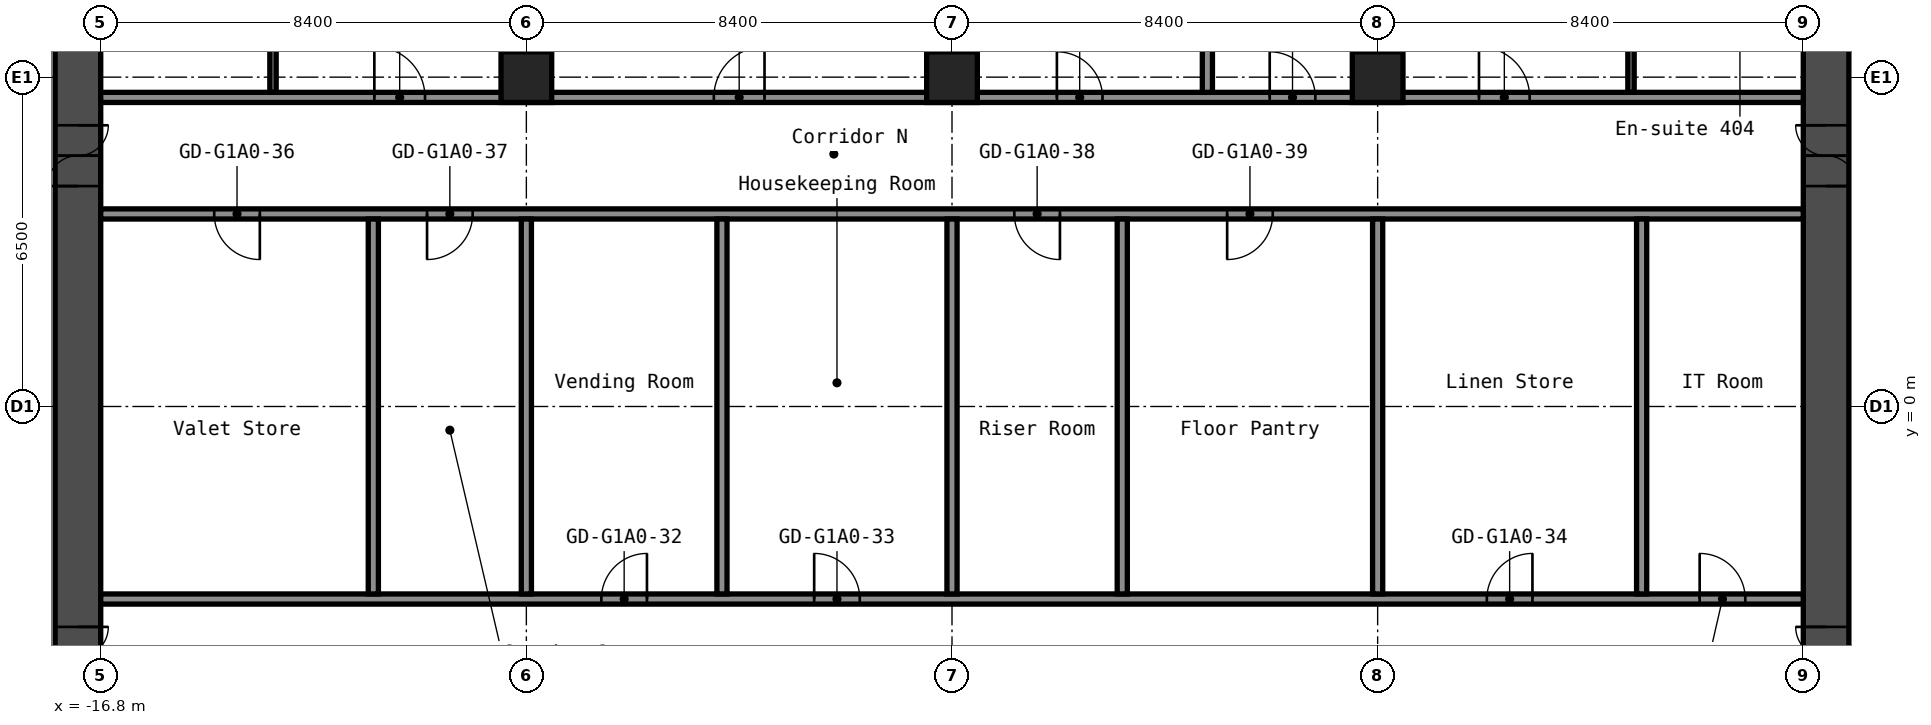
"""IFC4 building model, lengths in metres.
Left out: names, types, materials, properties, quantities, classifications, styles, units other than length and angle.
Written with IfcOpenShell. Run it as: python <this file> out.ifc"""

import sys

from ifc_helpers import new_model, si_unit, direction, frame, frame_2d, origin, origin_2d, place, context, subcontext, project, spatial, rectangle, hollow_rectangle, extrude, element, fill, save


model = new_model("IFC4")
c1 = context("Model", 3, precision=1e-05, world=origin(), true_north=direction((0.0, 1.0)))
c2 = subcontext(c1, "Body", "Model", "MODEL_VIEW")
j1 = project(units=[si_unit("LENGTHUNIT", "METRE"), si_unit("PLANEANGLEUNIT", "RADIAN")], contexts=[c1])
p1 = place(None, origin())
s1 = spatial("IfcSite", under=j1, at=p1, CompositionType="ELEMENT")
p2 = place(p1, origin())
s2 = spatial("IfcBuilding", under=s1, at=p2, CompositionType="ELEMENT")
p3 = place(p2, frame((0.0, 0.0, 19.8)))
s3 = spatial("IfcBuildingStorey", under=s2, at=p3, CompositionType="ELEMENT", Elevation=19.8)
for number, where, z_axis, x_axis in (
    (1, (-8.4, 6.5, 0.0), (0.0, 0.0, 1.0), (1.0, 0.0, 0.0)),
    (2, (0.0, 6.5, 0.0), (0.0, 0.0, 1.0), (1.0, 0.0, 0.0)),
    (3, (8.4, 6.5, 0.0), (0.0, 0.0, 1.0), (1.0, 0.0, 0.0)),
):
    element("IfcColumn", number, at=place(p3, frame(where, z_axis=z_axis, x_axis=x_axis)), inside=s3, PredefinedType="COLUMN", context=c2, shape_type="SweptSolid", body=[
        extrude(hollow_rectangle(XDim=1.0, YDim=1.0, WallThickness=0.04, at=origin_2d()), origin(), (0.0, 0.0, 1.0), 2.8),
    ])
p4 = place(p3, frame((-17.25, -8.4, 0.0), z_axis=(0.0, 0.0, 1.0), x_axis=(0.0, 1.0, 0.0)))
e4 = element("IfcWall", 4, at=p4, inside=s3, PredefinedType="SHEAR", context=c2, shape_type="SweptSolid", body=[
    extrude(rectangle(XDim=16.8, YDim=0.9, at=frame_2d((8.4, 0.0))), origin(), (0.0, 0.0, 1.0), 2.8),
])
p5 = place(p4, frame((12.75, 0.0, 0.0)))
e5 = element("IfcOpeningElement", 5, at=p5, cuts=e4, PredefinedType="OPENING", context=c2, shape_type="SweptSolid", body=[
    extrude(rectangle(XDim=1.2, YDim=2.1, at=frame_2d((0.6, 1.05))), frame((0.0, 0.46, 0.0), z_axis=(0.0, -1.0, 0.0), x_axis=(1.0, 0.0, 0.0)), (0.0, 0.0, 1.0), 0.92),
])
p6 = place(p4, frame((2.85, 0.0, 0.0)))
e6 = element("IfcOpeningElement", 6, at=p6, cuts=e4, PredefinedType="OPENING", context=c2, shape_type="SweptSolid", body=[
    extrude(rectangle(XDim=1.2, YDim=2.1, at=frame_2d((0.6, 1.05))), frame((0.0, 0.46, 0.0), z_axis=(0.0, -1.0, 0.0), x_axis=(1.0, 0.0, 0.0)), (0.0, 0.0, 1.0), 0.92),
])
p7 = place(p3, frame((17.25, -8.4, 0.0), z_axis=(0.0, 0.0, 1.0), x_axis=(0.0, 1.0, 0.0)))
e7 = element("IfcWall", 7, at=p7, inside=s3, PredefinedType="SHEAR", context=c2, shape_type="SweptSolid", body=[
    extrude(rectangle(XDim=16.8, YDim=0.9, at=frame_2d((8.4, 0.0))), origin(), (0.0, 0.0, 1.0), 2.8),
])
p8 = place(p7, frame((12.75, 0.0, 0.0)))
e8 = element("IfcOpeningElement", 8, at=p8, cuts=e7, PredefinedType="OPENING", context=c2, shape_type="SweptSolid", body=[
    extrude(rectangle(XDim=1.2, YDim=2.1, at=frame_2d((0.6, 1.05))), frame((0.0, 0.46, 0.0), z_axis=(0.0, -1.0, 0.0), x_axis=(1.0, 0.0, 0.0)), (0.0, 0.0, 1.0), 0.92),
])
p9 = place(p7, frame((2.85, 0.0, 0.0)))
e9 = element("IfcOpeningElement", 9, at=p9, cuts=e7, PredefinedType="OPENING", context=c2, shape_type="SweptSolid", body=[
    extrude(rectangle(XDim=1.2, YDim=2.1, at=frame_2d((0.6, 1.05))), frame((0.0, 0.46, 0.0), z_axis=(0.0, -1.0, 0.0), x_axis=(1.0, 0.0, 0.0)), (0.0, 0.0, 1.0), 0.92),
])
p10 = place(p3, frame((-16.8, -3.8, 0.0), z_axis=(0.0, 0.0, 1.0), x_axis=(1.0, 0.0, 0.0)))
e10 = element("IfcWall", 10, at=p10, inside=s3, PredefinedType="PARTITIONING", context=c2, shape_type="SweptSolid", body=[
    extrude(rectangle(XDim=33.6, YDim=0.2, at=frame_2d((16.8, 0.0))), origin(), (0.0, 0.0, 1.0), 2.8),
])
p11 = place(p10, frame((9.88, 0.0, 0.0)))
e11 = element("IfcOpeningElement", 11, at=p11, cuts=e10, PredefinedType="OPENING", context=c2, shape_type="SweptSolid", body=[
    extrude(rectangle(XDim=0.9, YDim=2.1, at=frame_2d((0.45, 1.05))), frame((0.0, 0.11, 0.0), z_axis=(0.0, -1.0, 0.0), x_axis=(1.0, 0.0, 0.0)), (0.0, 0.0, 1.0), 0.22),
])
p12 = place(p10, frame((14.08, 0.0, 0.0)))
e12 = element("IfcOpeningElement", 12, at=p12, cuts=e10, PredefinedType="OPENING", context=c2, shape_type="SweptSolid", body=[
    extrude(rectangle(XDim=0.9, YDim=2.1, at=frame_2d((0.45, 1.05))), frame((0.0, 0.11, 0.0), z_axis=(0.0, -1.0, 0.0), x_axis=(1.0, 0.0, 0.0)), (0.0, 0.0, 1.0), 0.22),
])
p13 = place(p10, frame((27.355, 0.0, 0.0)))
e13 = element("IfcOpeningElement", 13, at=p13, cuts=e10, PredefinedType="OPENING", context=c2, shape_type="SweptSolid", body=[
    extrude(rectangle(XDim=0.9, YDim=2.1, at=frame_2d((0.45, 1.05))), frame((0.0, 0.11, 0.0), z_axis=(0.0, -1.0, 0.0), x_axis=(1.0, 0.0, 0.0)), (0.0, 0.0, 1.0), 0.22),
])
p14 = place(p10, frame((31.555, 0.0, 0.0)))
e14 = element("IfcOpeningElement", 14, at=p14, cuts=e10, PredefinedType="OPENING", context=c2, shape_type="SweptSolid", body=[
    extrude(rectangle(XDim=0.9, YDim=2.1, at=frame_2d((0.45, 1.05))), frame((0.0, 0.11, 0.0), z_axis=(0.0, -1.0, 0.0), x_axis=(1.0, 0.0, 0.0)), (0.0, 0.0, 1.0), 0.22),
])
p15 = place(p3, frame((-16.8, 3.8, 0.0), z_axis=(0.0, 0.0, 1.0), x_axis=(1.0, 0.0, 0.0)))
e15 = element("IfcWall", 15, at=p15, inside=s3, PredefinedType="PARTITIONING", context=c2, shape_type="SweptSolid", body=[
    extrude(rectangle(XDim=33.6, YDim=0.2, at=frame_2d((16.8, 0.0))), origin(), (0.0, 0.0, 1.0), 2.8),
])
p16 = place(p15, frame((2.24, 0.0, 0.0)))
e16 = element("IfcOpeningElement", 16, at=p16, cuts=e15, PredefinedType="OPENING", context=c2, shape_type="SweptSolid", body=[
    extrude(rectangle(XDim=0.9, YDim=2.1, at=frame_2d((0.45, 1.05))), frame((0.0, 0.11, 0.0), z_axis=(0.0, -1.0, 0.0), x_axis=(1.0, 0.0, 0.0)), (0.0, 0.0, 1.0), 0.22),
])
p17 = place(p15, frame((6.44, 0.0, 0.0)))
e17 = element("IfcOpeningElement", 17, at=p17, cuts=e15, PredefinedType="OPENING", context=c2, shape_type="SweptSolid", body=[
    extrude(rectangle(XDim=0.9, YDim=2.1, at=frame_2d((0.45, 1.05))), frame((0.0, 0.11, 0.0), z_axis=(0.0, -1.0, 0.0), x_axis=(1.0, 0.0, 0.0)), (0.0, 0.0, 1.0), 0.22),
])
p18 = place(p15, frame((18.03, 0.0, 0.0)))
e18 = element("IfcOpeningElement", 18, at=p18, cuts=e15, PredefinedType="OPENING", context=c2, shape_type="SweptSolid", body=[
    extrude(rectangle(XDim=0.9, YDim=2.1, at=frame_2d((0.45, 1.05))), frame((0.0, 0.11, 0.0), z_axis=(0.0, -1.0, 0.0), x_axis=(1.0, 0.0, 0.0)), (0.0, 0.0, 1.0), 0.22),
])
p19 = place(p15, frame((22.23, 0.0, 0.0)))
e19 = element("IfcOpeningElement", 19, at=p19, cuts=e15, PredefinedType="OPENING", context=c2, shape_type="SweptSolid", body=[
    extrude(rectangle(XDim=0.9, YDim=2.1, at=frame_2d((0.45, 1.05))), frame((0.0, 0.11, 0.0), z_axis=(0.0, -1.0, 0.0), x_axis=(1.0, 0.0, 0.0)), (0.0, 0.0, 1.0), 0.22),
])
p20 = place(p3, frame((-16.8, 6.1, 0.0), z_axis=(0.0, 0.0, 1.0), x_axis=(1.0, 0.0, 0.0)))
e20 = element("IfcWall", 20, at=p20, inside=s3, PredefinedType="PARTITIONING", context=c2, shape_type="SweptSolid", body=[
    extrude(rectangle(XDim=33.6, YDim=0.2, at=frame_2d((16.8, 0.0))), origin(), (0.0, 0.0, 1.0), 2.8),
])
p21 = place(p20, frame((5.4, 0.0, 0.0)))
e21 = element("IfcOpeningElement", 21, at=p21, cuts=e20, PredefinedType="OPENING", context=c2, shape_type="SweptSolid", body=[
    extrude(rectangle(XDim=1.0, YDim=2.1, at=frame_2d((0.5, 1.05))), frame((0.0, 0.11, 0.0), z_axis=(0.0, -1.0, 0.0), x_axis=(1.0, 0.0, 0.0)), (0.0, 0.0, 1.0), 0.22),
])
p22 = place(p20, frame((12.1, 0.0, 0.0)))
e22 = element("IfcOpeningElement", 22, at=p22, cuts=e20, PredefinedType="OPENING", context=c2, shape_type="SweptSolid", body=[
    extrude(rectangle(XDim=1.0, YDim=2.1, at=frame_2d((0.5, 1.05))), frame((0.0, 0.11, 0.0), z_axis=(0.0, -1.0, 0.0), x_axis=(1.0, 0.0, 0.0)), (0.0, 0.0, 1.0), 0.22),
])
p23 = place(p20, frame((18.87, 0.0, 0.0)))
e23 = element("IfcOpeningElement", 23, at=p23, cuts=e20, PredefinedType="OPENING", context=c2, shape_type="SweptSolid", body=[
    extrude(rectangle(XDim=0.9, YDim=2.1, at=frame_2d((0.45, 1.05))), frame((0.0, 0.11, 0.0), z_axis=(0.0, -1.0, 0.0), x_axis=(1.0, 0.0, 0.0)), (0.0, 0.0, 1.0), 0.22),
])
p24 = place(p20, frame((23.07, 0.0, 0.0)))
e24 = element("IfcOpeningElement", 24, at=p24, cuts=e20, PredefinedType="OPENING", context=c2, shape_type="SweptSolid", body=[
    extrude(rectangle(XDim=0.9, YDim=2.1, at=frame_2d((0.45, 1.05))), frame((0.0, 0.11, 0.0), z_axis=(0.0, -1.0, 0.0), x_axis=(1.0, 0.0, 0.0)), (0.0, 0.0, 1.0), 0.22),
])
p25 = place(p20, frame((27.2, 0.0, 0.0)))
e25 = element("IfcOpeningElement", 25, at=p25, cuts=e20, PredefinedType="OPENING", context=c2, shape_type="SweptSolid", body=[
    extrude(rectangle(XDim=1.0, YDim=2.1, at=frame_2d((0.5, 1.05))), frame((0.0, 0.11, 0.0), z_axis=(0.0, -1.0, 0.0), x_axis=(1.0, 0.0, 0.0)), (0.0, 0.0, 1.0), 0.22),
])
p26 = place(p3, frame((-13.4, 6.2, 0.0), z_axis=(0.0, 0.0, 1.0), x_axis=(0.0, 1.0, 0.0)))
e26 = element("IfcWall", 26, at=p26, inside=s3, PredefinedType="PARTITIONING", context=c2, shape_type="SweptSolid", body=[
    extrude(rectangle(XDim=3.3, YDim=0.125, at=frame_2d((1.65, 0.0))), origin(), (0.0, 0.0, 1.0), 2.8),
])
for number, where, z_axis, x_axis in (
    (27, (-11.42, -3.7, 0.0), (0.0, 0.0, 1.0), (0.0, 1.0, 0.0)),
    (28, (-8.4, -3.7, 0.0), (0.0, 0.0, 1.0), (0.0, 1.0, 0.0)),
):
    element("IfcWall", number, at=place(p3, frame(where, z_axis=z_axis, x_axis=x_axis)), inside=s3, PredefinedType="PARTITIONING", context=c2, shape_type="SweptSolid", body=[
        extrude(rectangle(XDim=7.4, YDim=0.2, at=frame_2d((3.7, 0.0))), origin(), (0.0, 0.0, 1.0), 2.8),
    ])
p27 = place(p3, frame((-8.4, 6.99, 0.0), z_axis=(0.0, 0.0, 1.0), x_axis=(0.0, 1.0, 0.0)))
e29 = element("IfcWall", 29, at=p27, inside=s3, PredefinedType="PARTITIONING", context=c2, shape_type="SweptSolid", body=[
    extrude(rectangle(XDim=13.31, YDim=0.2, at=frame_2d((6.655, 0.0))), origin(), (0.0, 0.0, 1.0), 2.8),
])
for number, where, z_axis, x_axis in (
    (30, (-4.54, -3.7, 0.0), (0.0, 0.0, 1.0), (0.0, 1.0, 0.0)),
    (31, (0.0, -3.7, 0.0), (0.0, 0.0, 1.0), (0.0, 1.0, 0.0)),
):
    element("IfcWall", number, at=place(p3, frame(where, z_axis=z_axis, x_axis=x_axis)), inside=s3, PredefinedType="PARTITIONING", context=c2, shape_type="SweptSolid", body=[
        extrude(rectangle(XDim=7.4, YDim=0.2, at=frame_2d((3.7, 0.0))), origin(), (0.0, 0.0, 1.0), 2.8),
    ])
p28 = place(p3, frame((0.0, 6.99, 0.0), z_axis=(0.0, 0.0, 1.0), x_axis=(0.0, 1.0, 0.0)))
e32 = element("IfcWall", 32, at=p28, inside=s3, PredefinedType="PARTITIONING", context=c2, shape_type="SweptSolid", body=[
    extrude(rectangle(XDim=13.31, YDim=0.2, at=frame_2d((6.655, 0.0))), origin(), (0.0, 0.0, 1.0), 2.8),
])
p29 = place(p3, frame((3.36, -3.7, 0.0), z_axis=(0.0, 0.0, 1.0), x_axis=(0.0, 1.0, 0.0)))
e33 = element("IfcWall", 33, at=p29, inside=s3, PredefinedType="PARTITIONING", context=c2, shape_type="SweptSolid", body=[
    extrude(rectangle(XDim=7.4, YDim=0.2, at=frame_2d((3.7, 0.0))), origin(), (0.0, 0.0, 1.0), 2.8),
])
p30 = place(p3, frame((5.04, 6.2, 0.0), z_axis=(0.0, 0.0, 1.0), x_axis=(0.0, 1.0, 0.0)))
e34 = element("IfcWall", 34, at=p30, inside=s3, PredefinedType="PARTITIONING", context=c2, shape_type="SweptSolid", body=[
    extrude(rectangle(XDim=14.1, YDim=0.2, at=frame_2d((7.05, 0.0))), origin(), (0.0, 0.0, 1.0), 2.8),
])
p31 = place(p3, frame((8.4, -3.7, 0.0), z_axis=(0.0, 0.0, 1.0), x_axis=(0.0, 1.0, 0.0)))
e35 = element("IfcWall", 35, at=p31, inside=s3, PredefinedType="PARTITIONING", context=c2, shape_type="SweptSolid", body=[
    extrude(rectangle(XDim=7.4, YDim=0.2, at=frame_2d((3.7, 0.0))), origin(), (0.0, 0.0, 1.0), 2.8),
])
p32 = place(p3, frame((8.4, 6.99, 0.0), z_axis=(0.0, 0.0, 1.0), x_axis=(0.0, 1.0, 0.0)))
e36 = element("IfcWall", 36, at=p32, inside=s3, PredefinedType="PARTITIONING", context=c2, shape_type="SweptSolid", body=[
    extrude(rectangle(XDim=13.31, YDim=0.2, at=frame_2d((6.655, 0.0))), origin(), (0.0, 0.0, 1.0), 2.8),
])
p33 = place(p3, frame((13.4, 6.2, 0.0), z_axis=(0.0, 0.0, 1.0), x_axis=(0.0, 1.0, 0.0)))
e37 = element("IfcWall", 37, at=p33, inside=s3, PredefinedType="PARTITIONING", context=c2, shape_type="SweptSolid", body=[
    extrude(rectangle(XDim=3.3, YDim=0.125, at=frame_2d((1.65, 0.0))), origin(), (0.0, 0.0, 1.0), 2.8),
])
p34 = place(p3, frame((13.61, -3.7, 0.0), z_axis=(0.0, 0.0, 1.0), x_axis=(0.0, 1.0, 0.0)))
e38 = element("IfcWall", 38, at=p34, inside=s3, PredefinedType="PARTITIONING", context=c2, shape_type="SweptSolid", body=[
    extrude(rectangle(XDim=7.4, YDim=0.2, at=frame_2d((3.7, 0.0))), origin(), (0.0, 0.0, 1.0), 2.8),
])
p35 = place(p5, origin())
e39 = element("IfcDoor", 39, at=p35, inside=s3, OperationType="DOUBLE_DOOR_SINGLE_SWING", PredefinedType="DOOR", context=c2, shape_type="SweptSolid", body=[
    extrude(rectangle(XDim=1.2, YDim=2.1, at=frame_2d((0.6, 1.05))), frame((0.0, 0.025, 0.0), z_axis=(0.0, -1.0, 0.0), x_axis=(1.0, 0.0, 0.0)), (0.0, 0.0, 1.0), 0.05),
])
fill(e5, e39)
p36 = place(p6, origin())
e40 = element("IfcDoor", 40, at=p36, inside=s3, OperationType="DOUBLE_DOOR_SINGLE_SWING", PredefinedType="DOOR", context=c2, shape_type="SweptSolid", body=[
    extrude(rectangle(XDim=1.2, YDim=2.1, at=frame_2d((0.6, 1.05))), frame((0.0, 0.025, 0.0), z_axis=(0.0, -1.0, 0.0), x_axis=(1.0, 0.0, 0.0)), (0.0, 0.0, 1.0), 0.05),
])
fill(e6, e40)
p37 = place(p8, origin())
e41 = element("IfcDoor", 41, at=p37, inside=s3, OperationType="DOUBLE_DOOR_SINGLE_SWING", PredefinedType="DOOR", context=c2, shape_type="SweptSolid", body=[
    extrude(rectangle(XDim=1.2, YDim=2.1, at=frame_2d((0.6, 1.05))), frame((0.0, 0.025, 0.0), z_axis=(0.0, -1.0, 0.0), x_axis=(1.0, 0.0, 0.0)), (0.0, 0.0, 1.0), 0.05),
])
fill(e8, e41)
p38 = place(p9, origin())
e42 = element("IfcDoor", 42, at=p38, inside=s3, OperationType="DOUBLE_DOOR_SINGLE_SWING", PredefinedType="DOOR", context=c2, shape_type="SweptSolid", body=[
    extrude(rectangle(XDim=1.2, YDim=2.1, at=frame_2d((0.6, 1.05))), frame((0.0, 0.025, 0.0), z_axis=(0.0, -1.0, 0.0), x_axis=(1.0, 0.0, 0.0)), (0.0, 0.0, 1.0), 0.05),
])
fill(e9, e42)
p39 = place(p11, origin())
e43 = element("IfcDoor", 43, at=p39, inside=s3, OperationType="SINGLE_SWING_LEFT", PredefinedType="DOOR", context=c2, shape_type="SweptSolid", body=[
    extrude(rectangle(XDim=0.9, YDim=2.1, at=frame_2d((0.45, 1.05))), frame((0.0, 0.025, 0.0), z_axis=(0.0, -1.0, 0.0), x_axis=(1.0, 0.0, 0.0)), (0.0, 0.0, 1.0), 0.05),
])
fill(e11, e43)
p40 = place(p12, origin())
e44 = element("IfcDoor", 44, at=p40, inside=s3, OperationType="SINGLE_SWING_RIGHT", PredefinedType="DOOR", context=c2, shape_type="SweptSolid", body=[
    extrude(rectangle(XDim=0.9, YDim=2.1, at=frame_2d((0.45, 1.05))), frame((0.0, 0.025, 0.0), z_axis=(0.0, -1.0, 0.0), x_axis=(1.0, 0.0, 0.0)), (0.0, 0.0, 1.0), 0.05),
])
fill(e12, e44)
p41 = place(p13, origin())
e45 = element("IfcDoor", 45, at=p41, inside=s3, OperationType="SINGLE_SWING_LEFT", PredefinedType="DOOR", context=c2, shape_type="SweptSolid", body=[
    extrude(rectangle(XDim=0.9, YDim=2.1, at=frame_2d((0.45, 1.05))), frame((0.0, 0.025, 0.0), z_axis=(0.0, -1.0, 0.0), x_axis=(1.0, 0.0, 0.0)), (0.0, 0.0, 1.0), 0.05),
])
fill(e13, e45)
p42 = place(p14, origin())
e46 = element("IfcDoor", 46, at=p42, inside=s3, OperationType="SINGLE_SWING_RIGHT", PredefinedType="DOOR", context=c2, shape_type="SweptSolid", body=[
    extrude(rectangle(XDim=0.9, YDim=2.1, at=frame_2d((0.45, 1.05))), frame((0.0, 0.025, 0.0), z_axis=(0.0, -1.0, 0.0), x_axis=(1.0, 0.0, 0.0)), (0.0, 0.0, 1.0), 0.05),
])
fill(e14, e46)
p43 = place(p16, origin())
e47 = element("IfcDoor", 47, at=p43, inside=s3, OperationType="SINGLE_SWING_RIGHT", PredefinedType="DOOR", context=c2, shape_type="SweptSolid", body=[
    extrude(rectangle(XDim=0.9, YDim=2.1, at=frame_2d((0.45, 1.05))), frame((0.0, 0.025, 0.0), z_axis=(0.0, -1.0, 0.0), x_axis=(1.0, 0.0, 0.0)), (0.0, 0.0, 1.0), 0.05),
])
fill(e16, e47)
p44 = place(p17, origin())
e48 = element("IfcDoor", 48, at=p44, inside=s3, OperationType="SINGLE_SWING_LEFT", PredefinedType="DOOR", context=c2, shape_type="SweptSolid", body=[
    extrude(rectangle(XDim=0.9, YDim=2.1, at=frame_2d((0.45, 1.05))), frame((0.0, 0.025, 0.0), z_axis=(0.0, -1.0, 0.0), x_axis=(1.0, 0.0, 0.0)), (0.0, 0.0, 1.0), 0.05),
])
fill(e17, e48)
p45 = place(p18, origin())
e49 = element("IfcDoor", 49, at=p45, inside=s3, OperationType="SINGLE_SWING_RIGHT", PredefinedType="DOOR", context=c2, shape_type="SweptSolid", body=[
    extrude(rectangle(XDim=0.9, YDim=2.1, at=frame_2d((0.45, 1.05))), frame((0.0, 0.025, 0.0), z_axis=(0.0, -1.0, 0.0), x_axis=(1.0, 0.0, 0.0)), (0.0, 0.0, 1.0), 0.05),
])
fill(e18, e49)
p46 = place(p19, origin())
e50 = element("IfcDoor", 50, at=p46, inside=s3, OperationType="SINGLE_SWING_LEFT", PredefinedType="DOOR", context=c2, shape_type="SweptSolid", body=[
    extrude(rectangle(XDim=0.9, YDim=2.1, at=frame_2d((0.45, 1.05))), frame((0.0, 0.025, 0.0), z_axis=(0.0, -1.0, 0.0), x_axis=(1.0, 0.0, 0.0)), (0.0, 0.0, 1.0), 0.05),
])
fill(e19, e50)
p47 = place(p21, origin())
e51 = element("IfcDoor", 51, at=p47, inside=s3, OperationType="SINGLE_SWING_RIGHT", PredefinedType="DOOR", context=c2, shape_type="SweptSolid", body=[
    extrude(rectangle(XDim=1.0, YDim=2.1, at=frame_2d((0.5, 1.05))), frame((0.0, 0.025, 0.0), z_axis=(0.0, -1.0, 0.0), x_axis=(1.0, 0.0, 0.0)), (0.0, 0.0, 1.0), 0.05),
])
fill(e21, e51)
p48 = place(p22, origin())
e52 = element("IfcDoor", 52, at=p48, inside=s3, OperationType="SINGLE_SWING_LEFT", PredefinedType="DOOR", context=c2, shape_type="SweptSolid", body=[
    extrude(rectangle(XDim=1.0, YDim=2.1, at=frame_2d((0.5, 1.05))), frame((0.0, 0.025, 0.0), z_axis=(0.0, -1.0, 0.0), x_axis=(1.0, 0.0, 0.0)), (0.0, 0.0, 1.0), 0.05),
])
fill(e22, e52)
p49 = place(p23, origin())
e53 = element("IfcDoor", 53, at=p49, inside=s3, OperationType="SINGLE_SWING_RIGHT", PredefinedType="DOOR", context=c2, shape_type="SweptSolid", body=[
    extrude(rectangle(XDim=0.9, YDim=2.1, at=frame_2d((0.45, 1.05))), frame((0.0, 0.025, 0.0), z_axis=(0.0, -1.0, 0.0), x_axis=(1.0, 0.0, 0.0)), (0.0, 0.0, 1.0), 0.05),
])
fill(e23, e53)
p50 = place(p24, origin())
e54 = element("IfcDoor", 54, at=p50, inside=s3, OperationType="SINGLE_SWING_RIGHT", PredefinedType="DOOR", context=c2, shape_type="SweptSolid", body=[
    extrude(rectangle(XDim=0.9, YDim=2.1, at=frame_2d((0.45, 1.05))), frame((0.0, 0.025, 0.0), z_axis=(0.0, -1.0, 0.0), x_axis=(1.0, 0.0, 0.0)), (0.0, 0.0, 1.0), 0.05),
])
fill(e24, e54)
p51 = place(p25, origin())
e55 = element("IfcDoor", 55, at=p51, inside=s3, OperationType="SINGLE_SWING_RIGHT", PredefinedType="DOOR", context=c2, shape_type="SweptSolid", body=[
    extrude(rectangle(XDim=1.0, YDim=2.1, at=frame_2d((0.5, 1.05))), frame((0.0, 0.025, 0.0), z_axis=(0.0, -1.0, 0.0), x_axis=(1.0, 0.0, 0.0)), (0.0, 0.0, 1.0), 0.05),
])
fill(e25, e55)
save(model, sys.argv[1])
